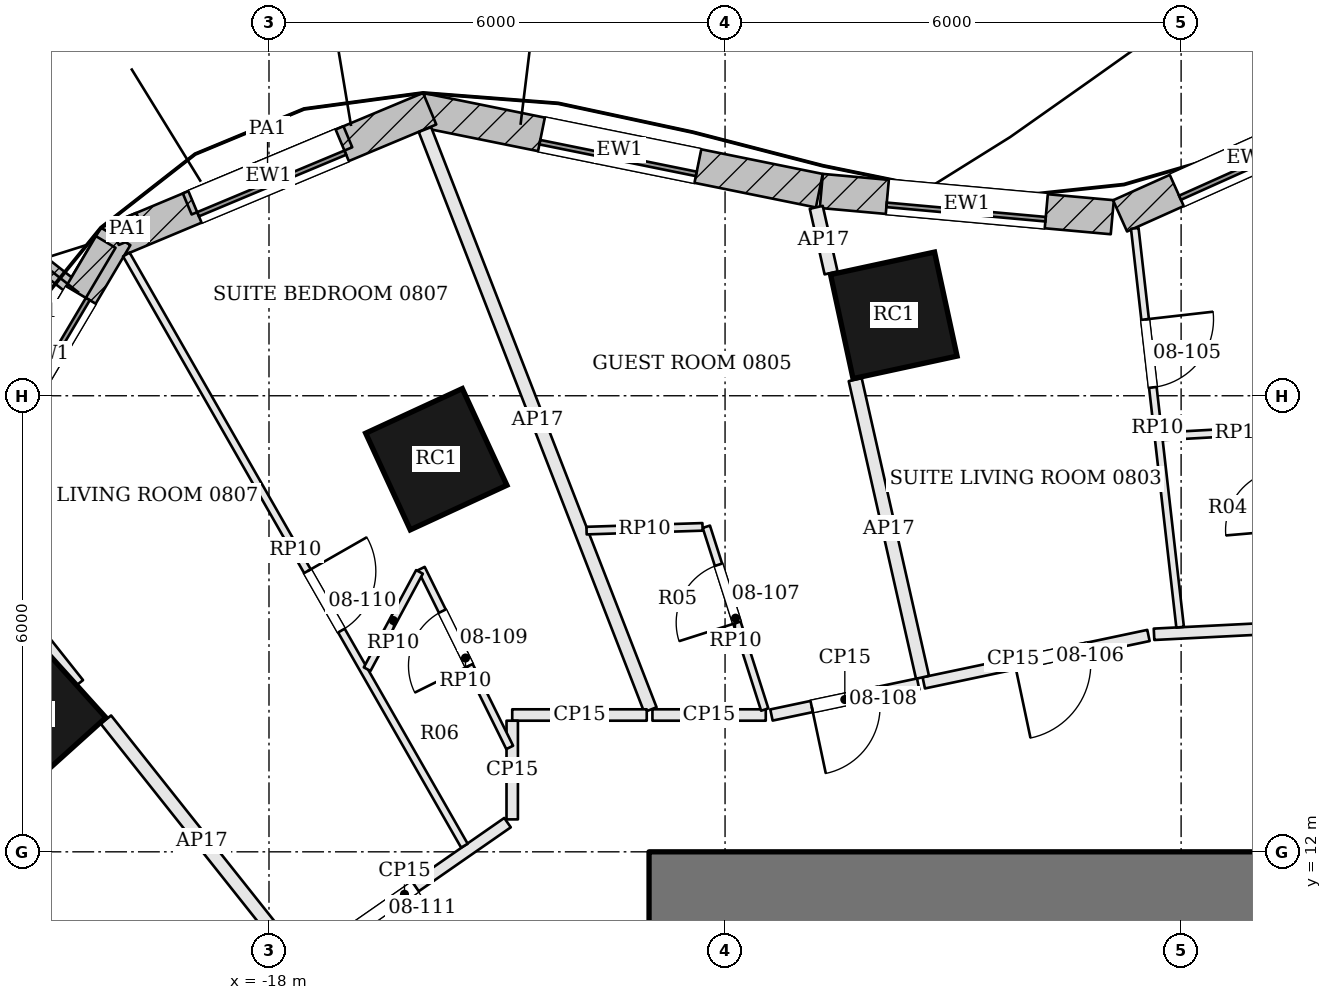
"""IFC4 building model, lengths in metres.
Left out: names, types, materials, properties, quantities, classifications, styles, units other than length and angle.
Written with IfcOpenShell. Run it as: python <this file> out.ifc"""

import sys

from ifc_helpers import new_model, si_unit, direction, frame, frame_2d, origin, origin_2d, place, context, subcontext, project, spatial, rectangle, extrude, element, fill, save


model = new_model("IFC4")
c1 = context("Model", 3, precision=1e-05, world=origin(), true_north=direction((0.0, 1.0)))
c2 = subcontext(c1, "Body", "Model", "MODEL_VIEW")
j1 = project(units=[si_unit("LENGTHUNIT", "METRE"), si_unit("PLANEANGLEUNIT", "RADIAN")], contexts=[c1])
p1 = place(None, origin())
s1 = spatial("IfcSite", under=j1, at=p1, CompositionType="ELEMENT")
p2 = place(p1, origin())
s2 = spatial("IfcBuilding", under=s1, at=p2, CompositionType="ELEMENT")
p3 = place(p2, frame((0.0, 0.0, 44.7)))
s3 = spatial("IfcBuildingStorey", under=s2, at=p3, CompositionType="ELEMENT", Elevation=44.7)
p4 = place(p3, frame((-13.0, 11.3, 0.0), z_axis=(0.0, 0.0, 1.0), x_axis=(1.0, 0.0, 0.0)))
e1 = element("IfcWall", 1, at=p4, inside=s3, PredefinedType="SHEAR", context=c2, shape_type="SweptSolid", body=[
    extrude(rectangle(XDim=26.0, YDim=1.4, at=frame_2d((13.0, 0.0))), origin(), (0.0, 0.0, 1.0), 3.6),
])
p5 = place(p4, frame((8.825, 0.0, 0.0)))
e2 = element("IfcOpeningElement", 2, at=p5, cuts=e1, PredefinedType="OPENING", context=c2, shape_type="SweptSolid", body=[
    extrude(rectangle(XDim=1.0, YDim=2.1, at=frame_2d((0.5, 1.05))), frame((0.0, 0.71, 0.0), z_axis=(0.0, -1.0, 0.0), x_axis=(1.0, 0.0, 0.0)), (0.0, 0.0, 1.0), 1.42),
])
p6 = place(p4, frame((11.275, 0.0, 0.0)))
e3 = element("IfcOpeningElement", 3, at=p6, cuts=e1, PredefinedType="OPENING", context=c2, shape_type="SweptSolid", body=[
    extrude(rectangle(XDim=1.0, YDim=2.1, at=frame_2d((0.5, 1.05))), frame((0.0, 0.71, 0.0), z_axis=(0.0, -1.0, 0.0), x_axis=(1.0, 0.0, 0.0)), (0.0, 0.0, 1.0), 1.42),
])
p7 = place(p4, frame((14.125, 0.0, 0.0)))
e4 = element("IfcOpeningElement", 4, at=p7, cuts=e1, PredefinedType="OPENING", context=c2, shape_type="SweptSolid", body=[
    extrude(rectangle(XDim=1.0, YDim=2.1, at=frame_2d((0.5, 1.05))), frame((0.0, 0.71, 0.0), z_axis=(0.0, -1.0, 0.0), x_axis=(1.0, 0.0, 0.0)), (0.0, 0.0, 1.0), 1.42),
])
p8 = place(p4, frame((16.725, 0.0, 0.0)))
e5 = element("IfcOpeningElement", 5, at=p8, cuts=e1, PredefinedType="OPENING", context=c2, shape_type="SweptSolid", body=[
    extrude(rectangle(XDim=0.7, YDim=2.1, at=frame_2d((0.35, 1.05))), frame((0.0, 0.71, 0.0), z_axis=(0.0, -1.0, 0.0), x_axis=(1.0, 0.0, 0.0)), (0.0, 0.0, 1.0), 1.42),
])
for number, where, z_axis, x_axis in (
    (6, (-9.78, 19.058, 0.0), (0.0, 0.0, 1.0), (-0.977, -0.211, 0.0)),
    (7, (-15.799, 17.165, 0.0), (0.0, 0.0, 1.0), (-0.908, -0.419, 0.0)),
    (8, (-21.135, 13.817, 0.0), (0.0, 0.0, 1.0), (-0.743, -0.67, 0.0)),
):
    element("IfcColumn", number, at=place(p3, frame(where, z_axis=z_axis, x_axis=x_axis)), inside=s3, PredefinedType="COLUMN", context=c2, shape_type="SweptSolid", body=[
        extrude(rectangle(XDim=1.4, YDim=1.4, at=origin_2d()), origin(), (0.0, 0.0, 1.0), 3.6),
    ])
p9 = place(p3, frame((-3.395, 21.894, 0.0), z_axis=(0.0, 0.0, 1.0), x_axis=(-0.912496703183, -0.409084058208, 0.0)))
e9 = element("IfcWall", 9, at=p9, inside=s3, PredefinedType="SOLIDWALL", context=c2, shape_type="SweptSolid", body=[
    extrude(rectangle(XDim=3.735, YDim=0.45, at=frame_2d((1.867, 0.0))), origin(), (0.0, 0.0, 1.0), 3.4),
])
p10 = place(p9, frame((0.817, 0.0, 0.9)))
e10 = element("IfcOpeningElement", 10, at=p10, cuts=e9, PredefinedType="OPENING", context=c2, shape_type="SweptSolid", body=[
    extrude(rectangle(XDim=2.1, YDim=2.0, at=frame_2d((1.05, 1.0))), frame((0.0, 0.235, 0.0), z_axis=(0.0, -1.0, 0.0), x_axis=(1.0, 0.0, 0.0)), (0.0, 0.0, 1.0), 0.47),
])
p11 = place(p3, frame((-6.906, 20.349, 0.0), z_axis=(0.0, 0.0, 1.0), x_axis=(-0.995947174038, 0.089940127451, 0.0)))
e11 = element("IfcWall", 11, at=p11, inside=s3, PredefinedType="SOLIDWALL", context=c2, shape_type="SweptSolid", body=[
    extrude(rectangle(XDim=3.844, YDim=0.45, at=frame_2d((1.922, 0.0))), origin(), (0.0, 0.0, 1.0), 3.4),
])
p12 = place(p11, frame((0.872, 0.0, 0.9)))
e12 = element("IfcOpeningElement", 12, at=p12, cuts=e11, PredefinedType="OPENING", context=c2, shape_type="SweptSolid", body=[
    extrude(rectangle(XDim=2.1, YDim=2.0, at=frame_2d((1.05, 1.0))), frame((0.0, 0.235, 0.0), z_axis=(0.0, -1.0, 0.0), x_axis=(1.0, 0.0, 0.0)), (0.0, 0.0, 1.0), 0.47),
])
p13 = place(p3, frame((-10.76, 20.698, 0.0), z_axis=(0.0, 0.0, 1.0), x_axis=(-0.980072890434, 0.198638187256, 0.0)))
e13 = element("IfcWall", 13, at=p13, inside=s3, PredefinedType="SOLIDWALL", context=c2, shape_type="SweptSolid", body=[
    extrude(rectangle(XDim=5.36, YDim=0.45, at=frame_2d((2.68, 0.0))), origin(), (0.0, 0.0, 1.0), 3.4),
])
p14 = place(p13, frame((1.63, 0.0, 0.9)))
e14 = element("IfcOpeningElement", 14, at=p14, cuts=e13, PredefinedType="OPENING", context=c2, shape_type="SweptSolid", body=[
    extrude(rectangle(XDim=2.1, YDim=2.0, at=frame_2d((1.05, 1.0))), frame((0.0, 0.235, 0.0), z_axis=(0.0, -1.0, 0.0), x_axis=(1.0, 0.0, 0.0)), (0.0, 0.0, 1.0), 0.47),
])
p15 = place(p3, frame((-15.886, 21.776, 0.0), z_axis=(0.0, 0.0, 1.0), x_axis=(-0.922527247898, -0.385931958882, 0.0)))
e15 = element("IfcWall", 15, at=p15, inside=s3, PredefinedType="SOLIDWALL", context=c2, shape_type="SweptSolid", body=[
    extrude(rectangle(XDim=4.594, YDim=0.45, at=frame_2d((2.297, 0.0))), origin(), (0.0, 0.0, 1.0), 3.4),
])
p16 = place(p15, frame((1.247, 0.0, 0.9)))
e16 = element("IfcOpeningElement", 16, at=p16, cuts=e15, PredefinedType="OPENING", context=c2, shape_type="SweptSolid", body=[
    extrude(rectangle(XDim=2.1, YDim=2.0, at=frame_2d((1.05, 1.0))), frame((0.0, 0.235, 0.0), z_axis=(0.0, -1.0, 0.0), x_axis=(1.0, 0.0, 0.0)), (0.0, 0.0, 1.0), 0.47),
])
p17 = place(p3, frame((-20.017, 20.096, 0.0), z_axis=(0.0, 0.0, 1.0), x_axis=(-0.509718522454, -0.860341227576, 0.0)))
e17 = element("IfcWall", 17, at=p17, inside=s3, PredefinedType="SOLIDWALL", context=c2, shape_type="SweptSolid", body=[
    extrude(rectangle(XDim=3.591, YDim=0.45, at=frame_2d((1.795, 0.0))), origin(), (0.0, 0.0, 1.0), 3.4),
])
p18 = place(p17, frame((0.896, 0.0, 0.9)))
e18 = element("IfcOpeningElement", 18, at=p18, cuts=e17, PredefinedType="OPENING", context=c2, shape_type="SweptSolid", body=[
    extrude(rectangle(XDim=1.8, YDim=2.0, at=frame_2d((0.9, 1.0))), frame((0.0, 0.235, 0.0), z_axis=(0.0, -1.0, 0.0), x_axis=(1.0, 0.0, 0.0)), (0.0, 0.0, 1.0), 0.47),
])
p19 = place(p3, frame((-20.5, 19.355, 0.0), z_axis=(0.0, 0.0, 1.0), x_axis=(-0.786700632228, 0.617334686577, 0.0)))
e19 = element("IfcWall", 19, at=p19, inside=s3, PredefinedType="SOLIDWALL", context=c2, shape_type="SweptSolid", body=[
    extrude(rectangle(XDim=1.75, YDim=0.2, at=frame_2d((0.875, 0.0))), origin(), (0.0, 0.0, 1.0), 3.4),
])
p20 = place(p3, frame((-16.962, 21.407, 3.6), z_axis=(0.0, 0.0, 1.0), x_axis=(-0.922533659014, -0.385916633467, 0.0)))
e20 = element("IfcWall", 20, at=p20, inside=s3, PredefinedType="PARAPET", context=c2, shape_type="SweptSolid", body=[
    extrude(rectangle(XDim=2.291, YDim=0.3, at=frame_2d((1.146, 0.0))), origin(), (0.0, 0.0, 1.0), 1.1),
])
p21 = place(p3, frame((-19.688, 20.267, 3.6), z_axis=(0.0, 0.0, 1.0), x_axis=(-0.922419372029, -0.386189722943, 0.0)))
e21 = element("IfcWall", 21, at=p21, inside=s3, PredefinedType="PARAPET", context=c2, shape_type="SweptSolid", body=[
    extrude(rectangle(XDim=0.374, YDim=0.3, at=frame_2d((0.187, 0.0))), origin(), (0.0, 0.0, 1.0), 1.1),
])
p22 = place(p3, frame((-20.148, 20.023, 3.6), z_axis=(0.0, 0.0, 1.0), x_axis=(-0.509657876052, -0.860377155309, 0.0)))
e22 = element("IfcWall", 22, at=p22, inside=s3, PredefinedType="PARAPET", context=c2, shape_type="SweptSolid", body=[
    extrude(rectangle(XDim=3.427, YDim=0.3, at=frame_2d((1.713, 0.0))), origin(), (0.0, 0.0, 1.0), 1.1),
])
p23 = place(p3, frame((0.089, 15.188, 0.0), z_axis=(0.0, 0.0, 1.0), x_axis=(-0.998725880164, -0.050464009853, 0.0)))
e23 = element("IfcWall", 23, at=p23, inside=s3, PredefinedType="PARTITIONING", context=c2, shape_type="SweptSolid", body=[
    extrude(rectangle(XDim=6.454, YDim=0.15, at=frame_2d((3.227, 0.0))), origin(), (0.0, 0.0, 1.0), 2.68),
])
p24 = place(p3, frame((-6.43, 14.846, 0.0), z_axis=(0.0, 0.0, 1.0), x_axis=(-0.978469112666, -0.206393303085, 0.0)))
e24 = element("IfcWall", 24, at=p24, inside=s3, PredefinedType="PARTITIONING", context=c2, shape_type="SweptSolid", body=[
    extrude(rectangle(XDim=3.021, YDim=0.15, at=frame_2d((1.51, 0.0))), origin(), (0.0, 0.0, 1.0), 2.68),
])
p25 = place(p24, frame((0.797, 0.0, 0.0)))
e25 = element("IfcOpeningElement", 25, at=p25, cuts=e24, PredefinedType="OPENING", context=c2, shape_type="SweptSolid", body=[
    extrude(rectangle(XDim=1.0, YDim=2.1, at=frame_2d((0.5, 1.05))), frame((0.0, 0.085, 0.0), z_axis=(0.0, -1.0, 0.0), x_axis=(1.0, 0.0, 0.0)), (0.0, 0.0, 1.0), 0.17),
])
p26 = place(p3, frame((-10.8, 20.479, 0.0), z_axis=(0.0, 0.0, 1.0), x_axis=(0.220786026072, -0.975322270171, 0.0)))
e26 = element("IfcWall", 26, at=p26, inside=s3, PredefinedType="PARTITIONING", context=c2, shape_type="SweptSolid", body=[
    extrude(rectangle(XDim=0.885, YDim=0.175, at=frame_2d((0.442, 0.0))), origin(), (0.0, 0.0, 1.0), 2.68),
])
p27 = place(p3, frame((-10.288, 18.211, 0.0), z_axis=(0.0, 0.0, 1.0), x_axis=(0.220522195693, -0.975381956572, 0.0)))
e27 = element("IfcWall", 27, at=p27, inside=s3, PredefinedType="PARTITIONING", context=c2, shape_type="SweptSolid", body=[
    extrude(rectangle(XDim=4.014, YDim=0.175, at=frame_2d((2.007, 0.0))), origin(), (0.0, 0.0, 1.0), 2.68),
])
p28 = place(p3, frame((-9.459, 14.207, 0.0), z_axis=(0.0, 0.0, 1.0), x_axis=(-0.978460400771, -0.206434600112, 0.0)))
e28 = element("IfcWall", 28, at=p28, inside=s3, PredefinedType="PARTITIONING", context=c2, shape_type="SweptSolid", body=[
    extrude(rectangle(XDim=1.973, YDim=0.15, at=frame_2d((0.986, 0.0))), origin(), (0.0, 0.0, 1.0), 2.68),
])
p29 = place(p28, frame((0.532, 0.0, 0.0)))
e29 = element("IfcOpeningElement", 29, at=p29, cuts=e28, PredefinedType="OPENING", context=c2, shape_type="SweptSolid", body=[
    extrude(rectangle(XDim=0.9, YDim=2.4, at=frame_2d((0.45, 1.2))), frame((0.0, 0.085, 0.0), z_axis=(0.0, -1.0, 0.0), x_axis=(1.0, 0.0, 0.0)), (0.0, 0.0, 1.0), 0.17),
])
p30 = place(p3, frame((-11.464, 13.8, 0.0), z_axis=(0.0, 0.0, 1.0), x_axis=(-1.0, 0.0, 0.0)))
e30 = element("IfcWall", 30, at=p30, inside=s3, PredefinedType="PARTITIONING", context=c2, shape_type="SweptSolid", body=[
    extrude(rectangle(XDim=1.491, YDim=0.15, at=frame_2d((0.746, 0.0))), origin(), (0.0, 0.0, 1.0), 2.68),
])
p31 = place(p3, frame((-15.948, 21.502, 0.0), z_axis=(0.0, 0.0, 1.0), x_axis=(0.362227551465, -0.932089695769, 0.0)))
e31 = element("IfcWall", 31, at=p31, inside=s3, PredefinedType="PARTITIONING", context=c2, shape_type="SweptSolid", body=[
    extrude(rectangle(XDim=8.188, YDim=0.175, at=frame_2d((4.094, 0.0))), origin(), (0.0, 0.0, 1.0), 2.68),
])
p32 = place(p3, frame((-13.03, 13.8, 0.0), z_axis=(0.0, 0.0, 1.0), x_axis=(-1.0, 0.0, 0.0)))
e32 = element("IfcWall", 32, at=p32, inside=s3, PredefinedType="PARTITIONING", context=c2, shape_type="SweptSolid", body=[
    extrude(rectangle(XDim=1.77, YDim=0.15, at=frame_2d((0.885, 0.0))), origin(), (0.0, 0.0, 1.0), 2.68),
])
p33 = place(p3, frame((-14.8, 13.725, 0.0), z_axis=(0.0, 0.0, 1.0), x_axis=(-0.000188040613, -0.99999998232, 0.0)))
e33 = element("IfcWall", 33, at=p33, inside=s3, PredefinedType="PARTITIONING", context=c2, shape_type="SweptSolid", body=[
    extrude(rectangle(XDim=1.298, YDim=0.15, at=frame_2d((0.649, 0.0))), origin(), (0.0, 0.0, 1.0), 2.68),
])
p34 = place(p3, frame((-14.862, 12.384, 0.0), z_axis=(0.0, 0.0, 1.0), x_axis=(-0.821144742038, -0.570719994939, 0.0)))
e34 = element("IfcWall", 34, at=p34, inside=s3, PredefinedType="PARTITIONING", context=c2, shape_type="SweptSolid", body=[
    extrude(rectangle(XDim=3.302, YDim=0.15, at=frame_2d((1.651, 0.0))), origin(), (0.0, 0.0, 1.0), 2.68),
])
p35 = place(p34, frame((1.474, 0.0, 0.0)))
e35 = element("IfcOpeningElement", 35, at=p35, cuts=e34, PredefinedType="OPENING", context=c2, shape_type="SweptSolid", body=[
    extrude(rectangle(XDim=1.0, YDim=2.1, at=frame_2d((0.5, 1.05))), frame((0.0, 0.085, 0.0), z_axis=(0.0, -1.0, 0.0), x_axis=(1.0, 0.0, 0.0)), (0.0, 0.0, 1.0), 0.17),
])
p36 = place(p3, frame((-21.946, 16.007, 0.0), z_axis=(0.0, 0.0, 1.0), x_axis=(0.621870662711, -0.783119964539, 0.0)))
e36 = element("IfcWall", 36, at=p36, inside=s3, PredefinedType="PARTITIONING", context=c2, shape_type="SweptSolid", body=[
    extrude(rectangle(XDim=2.301, YDim=0.175, at=frame_2d((1.151, 0.0))), origin(), (0.0, 0.0, 1.0), 2.68),
])
p37 = place(p3, frame((-20.146, 13.74, 0.0), z_axis=(0.0, 0.0, 1.0), x_axis=(0.621832273855, -0.783150447355, 0.0)))
e37 = element("IfcWall", 37, at=p37, inside=s3, PredefinedType="PARTITIONING", context=c2, shape_type="SweptSolid", body=[
    extrude(rectangle(XDim=4.062, YDim=0.175, at=frame_2d((2.031, 0.0))), origin(), (0.0, 0.0, 1.0), 2.68),
])
p38 = place(p3, frame((-6.61, 20.202, 0.0), z_axis=(0.0, 0.0, 1.0), x_axis=(0.113028971682, -0.993591692578, 0.0)))
e38 = element("IfcWall", 38, at=p38, inside=s3, PredefinedType="PARTITIONING", context=c2, shape_type="SweptSolid", body=[
    extrude(rectangle(XDim=5.281, YDim=0.1, at=frame_2d((2.641, 0.0))), origin(), (0.0, 0.0, 1.0), 2.68),
])
p39 = place(p38, frame((1.206, 0.0, 0.0)))
e39 = element("IfcOpeningElement", 39, at=p39, cuts=e38, PredefinedType="OPENING", context=c2, shape_type="SweptSolid", body=[
    extrude(rectangle(XDim=0.9, YDim=2.4, at=frame_2d((0.45, 1.2))), frame((0.0, 0.06, 0.0), z_axis=(0.0, -1.0, 0.0), x_axis=(1.0, 0.0, 0.0)), (0.0, 0.0, 1.0), 0.12),
])
p40 = place(p3, frame((-4.778, 17.548, 0.0), z_axis=(0.0, 0.0, 1.0), x_axis=(-0.998474099217, -0.055222035383, 0.0)))
e40 = element("IfcWall", 40, at=p40, inside=s3, PredefinedType="PARTITIONING", context=c2, shape_type="SweptSolid", body=[
    extrude(rectangle(XDim=1.472, YDim=0.1, at=frame_2d((0.736, 0.0))), origin(), (0.0, 0.0, 1.0), 2.68),
])
p41 = place(p3, frame((-11.478, 13.871, 0.0), z_axis=(0.0, 0.0, 1.0), x_axis=(-0.304252990033, 0.952591264948, 0.0)))
e41 = element("IfcWall", 41, at=p41, inside=s3, PredefinedType="PARTITIONING", context=c2, shape_type="SweptSolid", body=[
    extrude(rectangle(XDim=2.525, YDim=0.1, at=frame_2d((1.263, 0.0))), origin(), (0.0, 0.0, 1.0), 2.68),
])
p42 = place(p41, frame((1.2, 0.0, 0.0)))
e42 = element("IfcOpeningElement", 42, at=p42, cuts=e41, PredefinedType="OPENING", context=c2, shape_type="SweptSolid", body=[
    extrude(rectangle(XDim=0.8, YDim=2.1, at=frame_2d((0.4, 1.05))), frame((0.0, 0.06, 0.0), z_axis=(0.0, -1.0, 0.0), x_axis=(1.0, 0.0, 0.0)), (0.0, 0.0, 1.0), 0.12),
])
p43 = place(p3, frame((-12.296, 16.275, 0.0), z_axis=(0.0, 0.0, 1.0), x_axis=(-0.999477950715, -0.032308296695, 0.0)))
e43 = element("IfcWall", 43, at=p43, inside=s3, PredefinedType="PARTITIONING", context=c2, shape_type="SweptSolid", body=[
    extrude(rectangle(XDim=1.526, YDim=0.1, at=frame_2d((0.763, 0.0))), origin(), (0.0, 0.0, 1.0), 2.68),
])
p44 = place(p3, frame((-19.877, 19.859, 0.0), z_axis=(0.0, 0.0, 1.0), x_axis=(0.496435286224, -0.868073733384, 0.0)))
e44 = element("IfcWall", 44, at=p44, inside=s3, PredefinedType="PARTITIONING", context=c2, shape_type="SweptSolid", body=[
    extrude(rectangle(XDim=8.96, YDim=0.1, at=frame_2d((4.48, 0.0))), origin(), (0.0, 0.0, 1.0), 2.68),
])
p45 = place(p44, frame((4.8, 0.0, 0.0)))
e45 = element("IfcOpeningElement", 45, at=p45, cuts=e44, PredefinedType="OPENING", context=c2, shape_type="SweptSolid", body=[
    extrude(rectangle(XDim=0.9, YDim=2.4, at=frame_2d((0.45, 1.2))), frame((0.0, 0.06, 0.0), z_axis=(0.0, -1.0, 0.0), x_axis=(1.0, 0.0, 0.0)), (0.0, 0.0, 1.0), 0.12),
])
p46 = place(p3, frame((-14.833, 13.373, 0.0), z_axis=(0.0, 0.0, 1.0), x_axis=(-0.44307937406, 0.89648238593, 0.0)))
e46 = element("IfcWall", 46, at=p46, inside=s3, PredefinedType="PARTITIONING", context=c2, shape_type="SweptSolid", body=[
    extrude(rectangle(XDim=2.625, YDim=0.1, at=frame_2d((1.312, 0.0))), origin(), (0.0, 0.0, 1.0), 2.68),
])
p47 = place(p46, frame((1.2, 0.0, 0.0)))
e47 = element("IfcOpeningElement", 47, at=p47, cuts=e46, PredefinedType="OPENING", context=c2, shape_type="SweptSolid", body=[
    extrude(rectangle(XDim=0.8, YDim=2.1, at=frame_2d((0.4, 1.05))), frame((0.0, 0.06, 0.0), z_axis=(0.0, -1.0, 0.0), x_axis=(1.0, 0.0, 0.0)), (0.0, 0.0, 1.0), 0.12),
])
p48 = place(p3, frame((-16.02, 15.683, 0.0), z_axis=(0.0, 0.0, 1.0), x_axis=(-0.474029678045, -0.880508866698, 0.0)))
e48 = element("IfcWall", 48, at=p48, inside=s3, PredefinedType="PARTITIONING", context=c2, shape_type="SweptSolid", body=[
    extrude(rectangle(XDim=1.453, YDim=0.1, at=frame_2d((0.727, 0.0))), origin(), (0.0, 0.0, 1.0), 2.68),
])
p49 = place(p10, origin())
e49 = element("IfcWindow", 49, at=p49, inside=s3, PartitioningType="SINGLE_PANEL", PredefinedType="WINDOW", context=c2, shape_type="SweptSolid", body=[
    extrude(rectangle(XDim=2.1, YDim=2.0, at=frame_2d((1.05, 1.0))), frame((0.0, 0.135, 0.0), z_axis=(0.0, -1.0, 0.0), x_axis=(1.0, 0.0, 0.0)), (0.0, 0.0, 1.0), 0.06),
])
fill(e10, e49)
p50 = place(p12, origin())
e50 = element("IfcWindow", 50, at=p50, inside=s3, PartitioningType="SINGLE_PANEL", PredefinedType="WINDOW", context=c2, shape_type="SweptSolid", body=[
    extrude(rectangle(XDim=2.1, YDim=2.0, at=frame_2d((1.05, 1.0))), frame((0.0, 0.135, 0.0), z_axis=(0.0, -1.0, 0.0), x_axis=(1.0, 0.0, 0.0)), (0.0, 0.0, 1.0), 0.06),
])
fill(e12, e50)
p51 = place(p14, origin())
e51 = element("IfcWindow", 51, at=p51, inside=s3, PartitioningType="SINGLE_PANEL", PredefinedType="WINDOW", context=c2, shape_type="SweptSolid", body=[
    extrude(rectangle(XDim=2.1, YDim=2.0, at=frame_2d((1.05, 1.0))), frame((0.0, 0.135, 0.0), z_axis=(0.0, -1.0, 0.0), x_axis=(1.0, 0.0, 0.0)), (0.0, 0.0, 1.0), 0.06),
])
fill(e14, e51)
p52 = place(p16, origin())
e52 = element("IfcWindow", 52, at=p52, inside=s3, PartitioningType="SINGLE_PANEL", PredefinedType="WINDOW", context=c2, shape_type="SweptSolid", body=[
    extrude(rectangle(XDim=2.1, YDim=2.0, at=frame_2d((1.05, 1.0))), frame((0.0, 0.135, 0.0), z_axis=(0.0, -1.0, 0.0), x_axis=(1.0, 0.0, 0.0)), (0.0, 0.0, 1.0), 0.06),
])
fill(e16, e52)
p53 = place(p18, origin())
e53 = element("IfcWindow", 53, at=p53, inside=s3, PartitioningType="SINGLE_PANEL", PredefinedType="WINDOW", context=c2, shape_type="SweptSolid", body=[
    extrude(rectangle(XDim=1.8, YDim=2.0, at=frame_2d((0.9, 1.0))), frame((0.0, 0.135, 0.0), z_axis=(0.0, -1.0, 0.0), x_axis=(1.0, 0.0, 0.0)), (0.0, 0.0, 1.0), 0.06),
])
fill(e18, e53)
p54 = place(p39, origin())
e54 = element("IfcDoor", 54, at=p54, inside=s3, OperationType="SINGLE_SWING_LEFT", PredefinedType="DOOR", context=c2, shape_type="SweptSolid", body=[
    extrude(rectangle(XDim=0.9, YDim=2.4, at=frame_2d((0.45, 1.2))), frame((0.0, 0.025, 0.0), z_axis=(0.0, -1.0, 0.0), x_axis=(1.0, 0.0, 0.0)), (0.0, 0.0, 1.0), 0.05),
])
fill(e39, e54)
p55 = place(p25, origin())
e55 = element("IfcDoor", 55, at=p55, inside=s3, OperationType="SINGLE_SWING_RIGHT", PredefinedType="DOOR", context=c2, shape_type="SweptSolid", body=[
    extrude(rectangle(XDim=1.0, YDim=2.1, at=frame_2d((0.5, 1.05))), frame((0.0, 0.025, 0.0), z_axis=(0.0, -1.0, 0.0), x_axis=(1.0, 0.0, 0.0)), (0.0, 0.0, 1.0), 0.05),
])
fill(e25, e55)
p56 = place(p42, origin())
e56 = element("IfcDoor", 56, at=p56, inside=s3, OperationType="SINGLE_SWING_LEFT", PredefinedType="DOOR", context=c2, shape_type="SweptSolid", body=[
    extrude(rectangle(XDim=0.8, YDim=2.1, at=frame_2d((0.4, 1.05))), frame((0.0, 0.025, 0.0), z_axis=(0.0, -1.0, 0.0), x_axis=(1.0, 0.0, 0.0)), (0.0, 0.0, 1.0), 0.05),
])
fill(e42, e56)
p57 = place(p29, origin())
e57 = element("IfcDoor", 57, at=p57, inside=s3, OperationType="SINGLE_SWING_RIGHT", PredefinedType="DOOR", context=c2, shape_type="SweptSolid", body=[
    extrude(rectangle(XDim=0.9, YDim=2.4, at=frame_2d((0.45, 1.2))), frame((0.0, 0.025, 0.0), z_axis=(0.0, -1.0, 0.0), x_axis=(1.0, 0.0, 0.0)), (0.0, 0.0, 1.0), 0.05),
])
fill(e29, e57)
p58 = place(p47, origin())
e58 = element("IfcDoor", 58, at=p58, inside=s3, OperationType="SINGLE_SWING_LEFT", PredefinedType="DOOR", context=c2, shape_type="SweptSolid", body=[
    extrude(rectangle(XDim=0.8, YDim=2.1, at=frame_2d((0.4, 1.05))), frame((0.0, 0.025, 0.0), z_axis=(0.0, -1.0, 0.0), x_axis=(1.0, 0.0, 0.0)), (0.0, 0.0, 1.0), 0.05),
])
fill(e47, e58)
p59 = place(p45, origin())
e59 = element("IfcDoor", 59, at=p59, inside=s3, OperationType="SINGLE_SWING_LEFT", PredefinedType="DOOR", context=c2, shape_type="SweptSolid", body=[
    extrude(rectangle(XDim=0.9, YDim=2.4, at=frame_2d((0.45, 1.2))), frame((0.0, 0.025, 0.0), z_axis=(0.0, -1.0, 0.0), x_axis=(1.0, 0.0, 0.0)), (0.0, 0.0, 1.0), 0.05),
])
fill(e45, e59)
p60 = place(p35, origin())
e60 = element("IfcDoor", 60, at=p60, inside=s3, OperationType="SINGLE_SWING_RIGHT", PredefinedType="DOOR", context=c2, shape_type="SweptSolid", body=[
    extrude(rectangle(XDim=1.0, YDim=2.1, at=frame_2d((0.5, 1.05))), frame((0.0, 0.025, 0.0), z_axis=(0.0, -1.0, 0.0), x_axis=(1.0, 0.0, 0.0)), (0.0, 0.0, 1.0), 0.05),
])
fill(e35, e60)
save(model, sys.argv[1])
